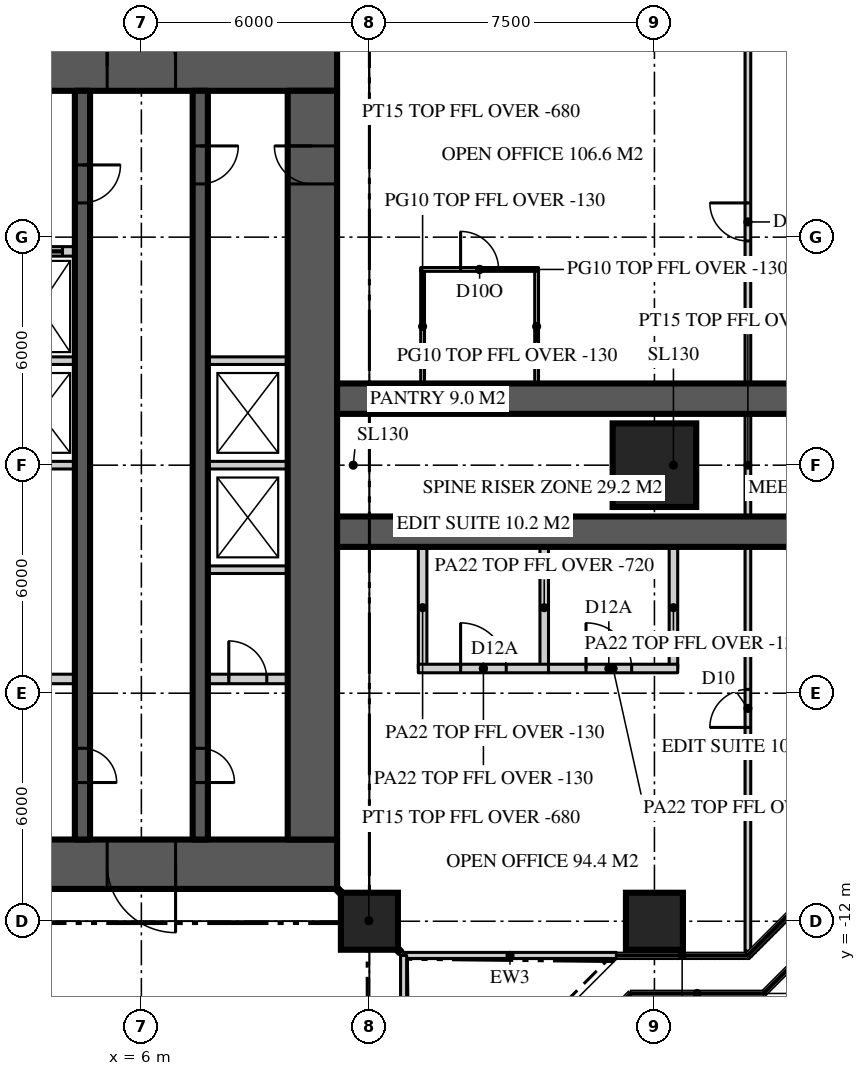
"""IFC4 building model, lengths in metres.
Left out: names, types, materials, properties, quantities, classifications, styles, units other than length and angle.
Written with IfcOpenShell. Run it as: python <this file> out.ifc"""

import sys

from ifc_helpers import new_model, si_unit, direction, frame, frame_2d, origin, origin_2d, place, context, subcontext, project, spatial, rectangle, extrude, element, fill, save


model = new_model("IFC4")
c1 = context("Model", 3, precision=1e-05, world=origin(), true_north=direction((0.0, 1.0)))
c2 = subcontext(c1, "Body", "Model", "MODEL_VIEW")
j1 = project(units=[si_unit("LENGTHUNIT", "METRE"), si_unit("PLANEANGLEUNIT", "RADIAN")], contexts=[c1])
p1 = place(None, origin())
s1 = spatial("IfcSite", under=j1, at=p1, CompositionType="ELEMENT")
p2 = place(p1, origin())
s2 = spatial("IfcBuilding", under=s1, at=p2, CompositionType="ELEMENT")
p3 = place(p2, frame((0.0, 0.0, 228.3)))
s3 = spatial("IfcBuildingStorey", under=s2, at=p3, CompositionType="ELEMENT", Elevation=228.3)
p4 = place(p3, frame((-11.15, 10.5, 0.0), z_axis=(0.0, 0.0, 1.0), x_axis=(1.0, 0.0, 0.0)))
e1 = element("IfcWall", 1, at=p4, inside=s3, PredefinedType="SHEAR", context=c2, shape_type="SweptSolid", body=[
    extrude(rectangle(XDim=22.3, YDim=1.3, at=frame_2d((11.15, 0.0))), origin(), (0.0, 0.0, 1.0), 3.9),
])
p5 = place(p4, frame((4.25, 0.0, 0.0)))
e2 = element("IfcOpeningElement", 2, at=p5, cuts=e1, PredefinedType="OPENING", context=c2, shape_type="SweptSolid", body=[
    extrude(rectangle(XDim=1.8, YDim=2.2, at=frame_2d((0.9, 1.1))), frame((0.0, 0.66, 0.0), z_axis=(0.0, -1.0, 0.0), x_axis=(1.0, 0.0, 0.0)), (0.0, 0.0, 1.0), 1.32),
])
p6 = place(p4, frame((16.25, 0.0, 0.0)))
e3 = element("IfcOpeningElement", 3, at=p6, cuts=e1, PredefinedType="OPENING", context=c2, shape_type="SweptSolid", body=[
    extrude(rectangle(XDim=1.8, YDim=2.2, at=frame_2d((0.9, 1.1))), frame((0.0, 0.66, 0.0), z_axis=(0.0, -1.0, 0.0), x_axis=(1.0, 0.0, 0.0)), (0.0, 0.0, 1.0), 1.32),
])
p7 = place(p3, frame((11.15, -10.5, 0.0), z_axis=(0.0, 0.0, 1.0), x_axis=(-1.0, 0.0, 0.0)))
e4 = element("IfcWall", 4, at=p7, inside=s3, PredefinedType="SHEAR", context=c2, shape_type="SweptSolid", body=[
    extrude(rectangle(XDim=22.3, YDim=1.3, at=frame_2d((11.15, 0.0))), origin(), (0.0, 0.0, 1.0), 3.9),
])
p8 = place(p7, frame((16.25, 0.0, 0.0)))
e5 = element("IfcOpeningElement", 5, at=p8, cuts=e4, PredefinedType="OPENING", context=c2, shape_type="SweptSolid", body=[
    extrude(rectangle(XDim=1.8, YDim=2.2, at=frame_2d((0.9, 1.1))), frame((0.0, 0.66, 0.0), z_axis=(0.0, -1.0, 0.0), x_axis=(1.0, 0.0, 0.0)), (0.0, 0.0, 1.0), 1.32),
])
p9 = place(p7, frame((4.25, 0.0, 0.0)))
e6 = element("IfcOpeningElement", 6, at=p9, cuts=e4, PredefinedType="OPENING", context=c2, shape_type="SweptSolid", body=[
    extrude(rectangle(XDim=1.8, YDim=2.2, at=frame_2d((0.9, 1.1))), frame((0.0, 0.66, 0.0), z_axis=(0.0, -1.0, 0.0), x_axis=(1.0, 0.0, 0.0)), (0.0, 0.0, 1.0), 1.32),
])
p10 = place(p3, frame((10.5, -9.85, 0.0), z_axis=(0.0, 0.0, 1.0), x_axis=(0.0, 1.0, 0.0)))
e7 = element("IfcWall", 7, at=p10, inside=s3, PredefinedType="SHEAR", context=c2, shape_type="SweptSolid", body=[
    extrude(rectangle(XDim=19.7, YDim=1.3, at=frame_2d((9.85, 0.0))), origin(), (0.0, 0.0, 1.0), 3.9),
])
p11 = place(p10, frame((17.25, 0.0, 0.0)))
e8 = element("IfcOpeningElement", 8, at=p11, cuts=e7, PredefinedType="OPENING", context=c2, shape_type="SweptSolid", body=[
    extrude(rectangle(XDim=1.0, YDim=2.2, at=frame_2d((0.5, 1.1))), frame((0.0, 0.66, 0.0), z_axis=(0.0, -1.0, 0.0), x_axis=(1.0, 0.0, 0.0)), (0.0, 0.0, 1.0), 1.32),
])
for number, where, z_axis, x_axis in (
    (9, (11.15, -1.75, 0.0), (0.0, 0.0, 1.0), (1.0, 0.0, 0.0)),
    (10, (11.15, 1.75, 0.0), (0.0, 0.0, 1.0), (1.0, 0.0, 0.0)),
):
    element("IfcWall", number, at=place(p3, frame(where, z_axis=z_axis, x_axis=x_axis)), inside=s3, PredefinedType="SHEAR", context=c2, shape_type="SweptSolid", body=[
        extrude(rectangle(XDim=15.25, YDim=0.8, at=frame_2d((7.625, 0.0))), origin(), (0.0, 0.0, 1.0), 3.9),
    ])
for number, where, z_axis, x_axis in (
    (11, (12.0, -12.0, 0.0), (0.0, 0.0, 1.0), (1.0, 0.0, 0.0)),
    (12, (19.5, -12.0, 0.0), (0.0, 0.0, 1.0), (1.0, 0.0, 0.0)),
):
    element("IfcColumn", number, at=place(p3, frame(where, z_axis=z_axis, x_axis=x_axis)), inside=s3, PredefinedType="COLUMN", context=c2, shape_type="SweptSolid", body=[
        extrude(rectangle(XDim=1.5, YDim=1.5, at=origin_2d()), origin(), (0.0, 0.0, 1.0), 3.9),
    ])
p12 = place(p3, frame((19.5, 0.0, 0.0), z_axis=(0.0, 0.0, 1.0), x_axis=(1.0, 0.0, 0.0)))
e13 = element("IfcColumn", 13, at=p12, inside=s3, PredefinedType="COLUMN", context=c2, shape_type="SweptSolid", body=[
    extrude(rectangle(XDim=2.2, YDim=2.2, at=origin_2d()), origin(), (0.0, 0.0, 1.0), 3.9),
])
p13 = place(p3, frame((12.9, -12.9, 0.0), z_axis=(0.0, 0.0, 1.0), x_axis=(1.0, 0.0, 0.0)))
e14 = element("IfcWall", 14, at=p13, inside=s3, PredefinedType="SOLIDWALL", context=c2, shape_type="SweptSolid", body=[
    extrude(rectangle(XDim=5.6, YDim=0.16, at=frame_2d((2.8, 0.0))), origin(), (0.0, 0.0, 1.0), 3.77),
])
p14 = place(p3, frame((12.9, -18.5, 0.0), z_axis=(0.0, 0.0, 1.0), x_axis=(0.0, 1.0, 0.0)))
e15 = element("IfcWall", 15, at=p14, inside=s3, PredefinedType="SOLIDWALL", context=c2, shape_type="SweptSolid", body=[
    extrude(rectangle(XDim=5.6, YDim=0.16, at=frame_2d((2.8, 0.0))), origin(), (0.0, 0.0, 1.0), 3.77),
])
p15 = place(p14, frame((2.3, 0.0, 0.0)))
e16 = element("IfcOpeningElement", 16, at=p15, cuts=e15, PredefinedType="OPENING", context=c2, shape_type="SweptSolid", body=[
    extrude(rectangle(XDim=1.0, YDim=2.2, at=frame_2d((0.5, 1.1))), frame((0.0, 0.09, 0.0), z_axis=(0.0, -1.0, 0.0), x_axis=(1.0, 0.0, 0.0)), (0.0, 0.0, 1.0), 0.18),
])
p16 = place(p3, frame((7.55, 9.85, 0.0), z_axis=(0.0, 0.0, 1.0), x_axis=(0.0, -1.0, 0.0)))
e17 = element("IfcWall", 17, at=p16, inside=s3, PredefinedType="SHEAR", context=c2, shape_type="SweptSolid", body=[
    extrude(rectangle(XDim=19.7, YDim=0.4, at=frame_2d((9.85, 0.0))), origin(), (0.0, 0.0, 1.0), 3.9),
])
p17 = place(p16, frame((1.45, 0.0, 0.0)))
e18 = element("IfcOpeningElement", 18, at=p17, cuts=e17, PredefinedType="OPENING", context=c2, shape_type="SweptSolid", body=[
    extrude(rectangle(XDim=1.0, YDim=2.2, at=frame_2d((0.5, 1.1))), frame((0.0, 0.21, 0.0), z_axis=(0.0, -1.0, 0.0), x_axis=(1.0, 0.0, 0.0)), (0.0, 0.0, 1.0), 0.42),
])
p18 = place(p16, frame((17.3, 0.0, 0.0)))
e19 = element("IfcOpeningElement", 19, at=p18, cuts=e17, PredefinedType="OPENING", context=c2, shape_type="SweptSolid", body=[
    extrude(rectangle(XDim=0.9, YDim=2.1, at=frame_2d((0.45, 1.05))), frame((0.0, 0.21, 0.0), z_axis=(0.0, -1.0, 0.0), x_axis=(1.0, 0.0, 0.0)), (0.0, 0.0, 1.0), 0.42),
])
p19 = place(p3, frame((4.45, 9.85, 0.0), z_axis=(0.0, 0.0, 1.0), x_axis=(0.0, -1.0, 0.0)))
e20 = element("IfcWall", 20, at=p19, inside=s3, PredefinedType="SHEAR", context=c2, shape_type="SweptSolid", body=[
    extrude(rectangle(XDim=19.7, YDim=0.4, at=frame_2d((9.85, 0.0))), origin(), (0.0, 0.0, 1.0), 3.9),
])
p20 = place(p19, frame((1.95, 0.0, 0.0)))
e21 = element("IfcOpeningElement", 21, at=p20, cuts=e20, PredefinedType="OPENING", context=c2, shape_type="SweptSolid", body=[
    extrude(rectangle(XDim=1.0, YDim=2.2, at=frame_2d((0.5, 1.1))), frame((0.0, 0.21, 0.0), z_axis=(0.0, -1.0, 0.0), x_axis=(1.0, 0.0, 0.0)), (0.0, 0.0, 1.0), 0.42),
])
p21 = place(p19, frame((17.3, 0.0, 0.0)))
e22 = element("IfcOpeningElement", 22, at=p21, cuts=e20, PredefinedType="OPENING", context=c2, shape_type="SweptSolid", body=[
    extrude(rectangle(XDim=0.9, YDim=2.1, at=frame_2d((0.45, 1.05))), frame((0.0, 0.21, 0.0), z_axis=(0.0, -1.0, 0.0), x_axis=(1.0, 0.0, 0.0)), (0.0, 0.0, 1.0), 0.42),
])
p22 = place(p3, frame((2.4, 5.625, 0.0), z_axis=(0.0, 0.0, 1.0), x_axis=(1.0, 0.0, 0.0)))
e23 = element("IfcWall", 23, at=p22, inside=s3, PredefinedType="SOLIDWALL", context=c2, shape_type="SweptSolid", body=[
    extrude(rectangle(XDim=1.85, YDim=0.25, at=frame_2d((0.925, 0.0))), origin(), (0.0, 0.0, 1.0), 3.7),
])
p23 = place(p22, frame((0.325, 0.0, 0.0)))
e24 = element("IfcOpeningElement", 24, at=p23, cuts=e23, PredefinedType="OPENING", context=c2, shape_type="SweptSolid", body=[
    extrude(rectangle(XDim=1.2, YDim=2.2, at=frame_2d((0.6, 1.1))), frame((0.0, 0.135, 0.0), z_axis=(0.0, -1.0, 0.0), x_axis=(1.0, 0.0, 0.0)), (0.0, 0.0, 1.0), 0.27),
])
p24 = place(p3, frame((2.4, -5.625, 0.0), z_axis=(0.0, 0.0, 1.0), x_axis=(1.0, 0.0, 0.0)))
e25 = element("IfcWall", 25, at=p24, inside=s3, PredefinedType="SOLIDWALL", context=c2, shape_type="SweptSolid", body=[
    extrude(rectangle(XDim=1.85, YDim=0.25, at=frame_2d((0.925, 0.0))), origin(), (0.0, 0.0, 1.0), 3.7),
])
p25 = place(p3, frame((7.75, -5.625, 0.0), z_axis=(0.0, 0.0, 1.0), x_axis=(1.0, 0.0, 0.0)))
e26 = element("IfcWall", 26, at=p25, inside=s3, PredefinedType="SOLIDWALL", context=c2, shape_type="SweptSolid", body=[
    extrude(rectangle(XDim=2.1, YDim=0.25, at=frame_2d((1.05, 0.0))), origin(), (0.0, 0.0, 1.0), 3.7),
])
p26 = place(p25, frame((0.55, 0.0, 0.0)))
e27 = element("IfcOpeningElement", 27, at=p26, cuts=e26, PredefinedType="OPENING", context=c2, shape_type="SweptSolid", body=[
    extrude(rectangle(XDim=1.0, YDim=2.2, at=frame_2d((0.5, 1.1))), frame((0.0, 0.135, 0.0), z_axis=(0.0, -1.0, 0.0), x_axis=(1.0, 0.0, 0.0)), (0.0, 0.0, 1.0), 0.27),
])
p27 = place(p3, frame((7.75, -2.75, 0.0), z_axis=(0.0, 0.0, 1.0), x_axis=(1.0, 0.0, 0.0)))
e28 = element("IfcWall", 28, at=p27, inside=s3, PredefinedType="SOLIDWALL", context=c2, shape_type="SweptSolid", body=[
    extrude(rectangle(XDim=2.1, YDim=0.2, at=frame_2d((1.05, 0.0))), origin(), (0.0, 0.0, 1.0), 3.7),
])
p28 = place(p3, frame((2.4, 0.0, 0.0), z_axis=(0.0, 0.0, 1.0), x_axis=(1.0, 0.0, 0.0)))
e29 = element("IfcWall", 29, at=p28, inside=s3, PredefinedType="SOLIDWALL", context=c2, shape_type="SweptSolid", body=[
    extrude(rectangle(XDim=1.85, YDim=0.2, at=frame_2d((0.925, 0.0))), origin(), (0.0, 0.0, 1.0), 3.7),
])
p29 = place(p3, frame((7.75, 0.0, 0.0), z_axis=(0.0, 0.0, 1.0), x_axis=(1.0, 0.0, 0.0)))
e30 = element("IfcWall", 30, at=p29, inside=s3, PredefinedType="SOLIDWALL", context=c2, shape_type="SweptSolid", body=[
    extrude(rectangle(XDim=2.1, YDim=0.2, at=frame_2d((1.05, 0.0))), origin(), (0.0, 0.0, 1.0), 3.7),
])
p30 = place(p3, frame((2.4, 2.75, 0.0), z_axis=(0.0, 0.0, 1.0), x_axis=(1.0, 0.0, 0.0)))
e31 = element("IfcWall", 31, at=p30, inside=s3, PredefinedType="SOLIDWALL", context=c2, shape_type="SweptSolid", body=[
    extrude(rectangle(XDim=1.85, YDim=0.2, at=frame_2d((0.925, 0.0))), origin(), (0.0, 0.0, 1.0), 3.7),
])
p31 = place(p3, frame((7.75, 2.75, 0.0), z_axis=(0.0, 0.0, 1.0), x_axis=(1.0, 0.0, 0.0)))
e32 = element("IfcWall", 32, at=p31, inside=s3, PredefinedType="SOLIDWALL", context=c2, shape_type="SweptSolid", body=[
    extrude(rectangle(XDim=2.1, YDim=0.2, at=frame_2d((1.05, 0.0))), origin(), (0.0, 0.0, 1.0), 3.7),
])
p32 = place(p3, frame((21.959, -12.786, 0.0), z_axis=(0.0, 0.0, 1.0), x_axis=(0.0, 1.0, 0.0)))
e33 = element("IfcWall", 33, at=p32, inside=s3, PredefinedType="PARTITIONING", context=c2, shape_type="SweptSolid", body=[
    extrude(rectangle(XDim=25.573, YDim=0.15, at=frame_2d((12.786, 0.0))), origin(), (0.0, 0.0, 1.0), 3.77),
])
p33 = place(p32, frame((18.687, 0.0, 0.0)))
e34 = element("IfcOpeningElement", 34, at=p33, cuts=e33, PredefinedType="OPENING", context=c2, shape_type="SweptSolid", body=[
    extrude(rectangle(XDim=1.0, YDim=2.2, at=frame_2d((0.5, 1.1))), frame((0.0, 0.085, 0.0), z_axis=(0.0, -1.0, 0.0), x_axis=(1.0, 0.0, 0.0)), (0.0, 0.0, 1.0), 0.17),
])
p34 = place(p32, frame((5.886, 0.0, 0.0)))
e35 = element("IfcOpeningElement", 35, at=p34, cuts=e33, PredefinedType="OPENING", context=c2, shape_type="SweptSolid", body=[
    extrude(rectangle(XDim=1.0, YDim=2.2, at=frame_2d((0.5, 1.1))), frame((0.0, 0.085, 0.0), z_axis=(0.0, -1.0, 0.0), x_axis=(1.0, 0.0, 0.0)), (0.0, 0.0, 1.0), 0.17),
])
for number, where, z_axis, x_axis in (
    (36, (13.4, 2.15, 0.0), (0.0, 0.0, 1.0), (0.0, 1.0, 0.0)),
    (37, (16.4, 2.15, 0.0), (0.0, 0.0, 1.0), (0.0, 1.0, 0.0)),
):
    element("IfcWall", number, at=place(p3, frame(where, z_axis=z_axis, x_axis=x_axis)), inside=s3, PredefinedType="PARTITIONING", context=c2, shape_type="SweptSolid", body=[
        extrude(rectangle(XDim=3.0, YDim=0.1, at=frame_2d((1.5, 0.0))), origin(), (0.0, 0.0, 1.0), 3.77),
    ])
p35 = place(p3, frame((13.35, 5.15, 0.0), z_axis=(0.0, 0.0, 1.0), x_axis=(1.0, 0.0, 0.0)))
e38 = element("IfcWall", 38, at=p35, inside=s3, PredefinedType="PARTITIONING", context=c2, shape_type="SweptSolid", body=[
    extrude(rectangle(XDim=3.1, YDim=0.1, at=frame_2d((1.55, 0.0))), origin(), (0.0, 0.0, 1.0), 3.77),
])
p36 = place(p35, frame((1.05, 0.0, 0.0)))
e39 = element("IfcOpeningElement", 39, at=p36, cuts=e38, PredefinedType="OPENING", context=c2, shape_type="SweptSolid", body=[
    extrude(rectangle(XDim=1.0, YDim=2.2, at=frame_2d((0.5, 1.1))), frame((0.0, 0.06, 0.0), z_axis=(0.0, -1.0, 0.0), x_axis=(1.0, 0.0, 0.0)), (0.0, 0.0, 1.0), 0.12),
])
p37 = place(p3, frame((13.4, -2.15, 0.0), z_axis=(0.0, 0.0, 1.0), x_axis=(0.0, -1.0, 0.0)))
e40 = element("IfcWall", 40, at=p37, inside=s3, PredefinedType="PARTITIONING", context=c2, shape_type="SweptSolid", body=[
    extrude(rectangle(XDim=3.2, YDim=0.225, at=frame_2d((1.6, 0.0))), origin(), (0.0, 0.0, 1.0), 3.77),
])
p38 = place(p3, frame((16.6, -2.15, 0.0), z_axis=(0.0, 0.0, 1.0), x_axis=(0.0, -1.0, 0.0)))
e41 = element("IfcWall", 41, at=p38, inside=s3, PredefinedType="PARTITIONING", context=c2, shape_type="SweptSolid", body=[
    extrude(rectangle(XDim=3.2, YDim=0.225, at=frame_2d((1.6, 0.0))), origin(), (0.0, 0.0, 1.0), 3.18),
])
p39 = place(p3, frame((13.288, -5.35, 0.0), z_axis=(0.0, 0.0, 1.0), x_axis=(1.0, 0.0, 0.0)))
e42 = element("IfcWall", 42, at=p39, inside=s3, PredefinedType="PARTITIONING", context=c2, shape_type="SweptSolid", body=[
    extrude(rectangle(XDim=3.425, YDim=0.225, at=frame_2d((1.712, 0.0))), origin(), (0.0, 0.0, 1.0), 3.77),
])
p40 = place(p39, frame((1.113, 0.0, 0.0)))
e43 = element("IfcOpeningElement", 43, at=p40, cuts=e42, PredefinedType="OPENING", context=c2, shape_type="SweptSolid", body=[
    extrude(rectangle(XDim=1.2, YDim=2.2, at=frame_2d((0.6, 1.1))), frame((0.0, 0.123, 0.0), z_axis=(0.0, -1.0, 0.0), x_axis=(1.0, 0.0, 0.0)), (0.0, 0.0, 1.0), 0.245),
])
p41 = place(p3, frame((20.0, -2.15, 0.0), z_axis=(0.0, 0.0, 1.0), x_axis=(0.0, -1.0, 0.0)))
e44 = element("IfcWall", 44, at=p41, inside=s3, PredefinedType="PARTITIONING", context=c2, shape_type="SweptSolid", body=[
    extrude(rectangle(XDim=3.2, YDim=0.225, at=frame_2d((1.6, 0.0))), origin(), (0.0, 0.0, 1.0), 3.77),
])
p42 = place(p3, frame((16.712, -5.35, 0.0), z_axis=(0.0, 0.0, 1.0), x_axis=(1.0, 0.0, 0.0)))
e45 = element("IfcWall", 45, at=p42, inside=s3, PredefinedType="PARTITIONING", context=c2, shape_type="SweptSolid", body=[
    extrude(rectangle(XDim=3.4, YDim=0.225, at=frame_2d((1.7, 0.0))), origin(), (0.0, 0.0, 1.0), 3.77),
])
p43 = place(p42, frame((0.988, 0.0, 0.0)))
e46 = element("IfcOpeningElement", 46, at=p43, cuts=e45, PredefinedType="OPENING", context=c2, shape_type="SweptSolid", body=[
    extrude(rectangle(XDim=1.2, YDim=2.2, at=frame_2d((0.6, 1.1))), frame((0.0, 0.123, 0.0), z_axis=(0.0, -1.0, 0.0), x_axis=(1.0, 0.0, 0.0)), (0.0, 0.0, 1.0), 0.245),
])
p44 = place(p3, frame((11.15, -11.15, 0.0), z_axis=(0.0, 0.0, 1.0), x_axis=(0.707106781187, -0.707106781187, 0.0)))
e47 = element("IfcWall", 47, at=p44, inside=s3, PredefinedType="PARTITIONING", context=c2, shape_type="SweptSolid", body=[
    extrude(rectangle(XDim=2.362, YDim=0.15, at=frame_2d((1.181, 0.0))), origin(), (0.0, 0.0, 1.0), 3.22),
])
p45 = place(p6, origin())
e48 = element("IfcDoor", 48, at=p45, inside=s3, OperationType="DOUBLE_DOOR_DOUBLE_SWING", PredefinedType="DOOR", context=c2, shape_type="SweptSolid", body=[
    extrude(rectangle(XDim=1.8, YDim=2.2, at=frame_2d((0.9, 1.1))), frame((0.0, 0.025, 0.0), z_axis=(0.0, -1.0, 0.0), x_axis=(1.0, 0.0, 0.0)), (0.0, 0.0, 1.0), 0.05),
])
fill(e3, e48)
p46 = place(p9, origin())
e49 = element("IfcDoor", 49, at=p46, inside=s3, OperationType="DOUBLE_DOOR_DOUBLE_SWING", PredefinedType="DOOR", context=c2, shape_type="SweptSolid", body=[
    extrude(rectangle(XDim=1.8, YDim=2.2, at=frame_2d((0.9, 1.1))), frame((0.0, 0.025, 0.0), z_axis=(0.0, -1.0, 0.0), x_axis=(1.0, 0.0, 0.0)), (0.0, 0.0, 1.0), 0.05),
])
fill(e6, e49)
p47 = place(p17, origin())
e50 = element("IfcDoor", 50, at=p47, inside=s3, OperationType="SINGLE_SWING_LEFT", PredefinedType="DOOR", context=c2, shape_type="SweptSolid", body=[
    extrude(rectangle(XDim=1.0, YDim=2.2, at=frame_2d((0.5, 1.1))), frame((0.0, 0.025, 0.0), z_axis=(0.0, -1.0, 0.0), x_axis=(1.0, 0.0, 0.0)), (0.0, 0.0, 1.0), 0.05),
])
fill(e18, e50)
p48 = place(p11, origin())
e51 = element("IfcDoor", 51, at=p48, inside=s3, OperationType="SINGLE_SWING_RIGHT", PredefinedType="DOOR", context=c2, shape_type="SweptSolid", body=[
    extrude(rectangle(XDim=1.0, YDim=2.2, at=frame_2d((0.5, 1.1))), frame((0.0, 0.025, 0.0), z_axis=(0.0, -1.0, 0.0), x_axis=(1.0, 0.0, 0.0)), (0.0, 0.0, 1.0), 0.05),
])
fill(e8, e51)
p49 = place(p20, origin())
e52 = element("IfcDoor", 52, at=p49, inside=s3, OperationType="SINGLE_SWING_LEFT", PredefinedType="DOOR", context=c2, shape_type="SweptSolid", body=[
    extrude(rectangle(XDim=1.0, YDim=2.2, at=frame_2d((0.5, 1.1))), frame((0.0, 0.025, 0.0), z_axis=(0.0, -1.0, 0.0), x_axis=(1.0, 0.0, 0.0)), (0.0, 0.0, 1.0), 0.05),
])
fill(e21, e52)
p50 = place(p18, origin())
e53 = element("IfcDoor", 53, at=p50, inside=s3, OperationType="SINGLE_SWING_RIGHT", PredefinedType="DOOR", context=c2, shape_type="SweptSolid", body=[
    extrude(rectangle(XDim=0.9, YDim=2.1, at=frame_2d((0.45, 1.05))), frame((0.0, 0.025, 0.0), z_axis=(0.0, -1.0, 0.0), x_axis=(1.0, 0.0, 0.0)), (0.0, 0.0, 1.0), 0.05),
])
fill(e19, e53)
p51 = place(p21, origin())
e54 = element("IfcDoor", 54, at=p51, inside=s3, OperationType="SINGLE_SWING_RIGHT", PredefinedType="DOOR", context=c2, shape_type="SweptSolid", body=[
    extrude(rectangle(XDim=0.9, YDim=2.1, at=frame_2d((0.45, 1.05))), frame((0.0, 0.025, 0.0), z_axis=(0.0, -1.0, 0.0), x_axis=(1.0, 0.0, 0.0)), (0.0, 0.0, 1.0), 0.05),
])
fill(e22, e54)
p52 = place(p23, origin())
e55 = element("IfcDoor", 55, at=p52, inside=s3, OperationType="SLIDING_TO_LEFT", PredefinedType="DOOR", context=c2, shape_type="SweptSolid", body=[
    extrude(rectangle(XDim=1.2, YDim=2.2, at=frame_2d((0.6, 1.1))), frame((0.0, 0.025, 0.0), z_axis=(0.0, -1.0, 0.0), x_axis=(1.0, 0.0, 0.0)), (0.0, 0.0, 1.0), 0.05),
])
fill(e24, e55)
p53 = place(p33, origin())
e56 = element("IfcDoor", 56, at=p53, inside=s3, OperationType="SINGLE_SWING_RIGHT", PredefinedType="DOOR", context=c2, shape_type="SweptSolid", body=[
    extrude(rectangle(XDim=1.0, YDim=2.2, at=frame_2d((0.5, 1.1))), frame((0.0, 0.025, 0.0), z_axis=(0.0, -1.0, 0.0), x_axis=(1.0, 0.0, 0.0)), (0.0, 0.0, 1.0), 0.05),
])
fill(e34, e56)
p54 = place(p34, origin())
e57 = element("IfcDoor", 57, at=p54, inside=s3, OperationType="SINGLE_SWING_LEFT", PredefinedType="DOOR", context=c2, shape_type="SweptSolid", body=[
    extrude(rectangle(XDim=1.0, YDim=2.2, at=frame_2d((0.5, 1.1))), frame((0.0, 0.025, 0.0), z_axis=(0.0, -1.0, 0.0), x_axis=(1.0, 0.0, 0.0)), (0.0, 0.0, 1.0), 0.05),
])
fill(e35, e57)
p55 = place(p36, origin())
e58 = element("IfcDoor", 58, at=p55, inside=s3, OperationType="SINGLE_SWING_LEFT", PredefinedType="DOOR", context=c2, shape_type="SweptSolid", body=[
    extrude(rectangle(XDim=1.0, YDim=2.2, at=frame_2d((0.5, 1.1))), frame((0.0, 0.025, 0.0), z_axis=(0.0, -1.0, 0.0), x_axis=(1.0, 0.0, 0.0)), (0.0, 0.0, 1.0), 0.05),
])
fill(e39, e58)
p56 = place(p40, origin())
e59 = element("IfcDoor", 59, at=p56, inside=s3, OperationType="SINGLE_SWING_LEFT", PredefinedType="DOOR", context=c2, shape_type="SweptSolid", body=[
    extrude(rectangle(XDim=1.2, YDim=2.2, at=frame_2d((0.6, 1.1))), frame((0.0, 0.025, 0.0), z_axis=(0.0, -1.0, 0.0), x_axis=(1.0, 0.0, 0.0)), (0.0, 0.0, 1.0), 0.05),
])
fill(e43, e59)
p57 = place(p43, origin())
e60 = element("IfcDoor", 60, at=p57, inside=s3, OperationType="SINGLE_SWING_LEFT", PredefinedType="DOOR", context=c2, shape_type="SweptSolid", body=[
    extrude(rectangle(XDim=1.2, YDim=2.2, at=frame_2d((0.6, 1.1))), frame((0.0, 0.025, 0.0), z_axis=(0.0, -1.0, 0.0), x_axis=(1.0, 0.0, 0.0)), (0.0, 0.0, 1.0), 0.05),
])
fill(e46, e60)
p58 = place(p26, origin())
e61 = element("IfcDoor", 61, at=p58, inside=s3, OperationType="SINGLE_SWING_LEFT", PredefinedType="DOOR", context=c2, shape_type="SweptSolid", body=[
    extrude(rectangle(XDim=1.0, YDim=2.2, at=frame_2d((0.5, 1.1))), frame((0.0, 0.025, 0.0), z_axis=(0.0, -1.0, 0.0), x_axis=(1.0, 0.0, 0.0)), (0.0, 0.0, 1.0), 0.05),
])
fill(e27, e61)
save(model, sys.argv[1])
